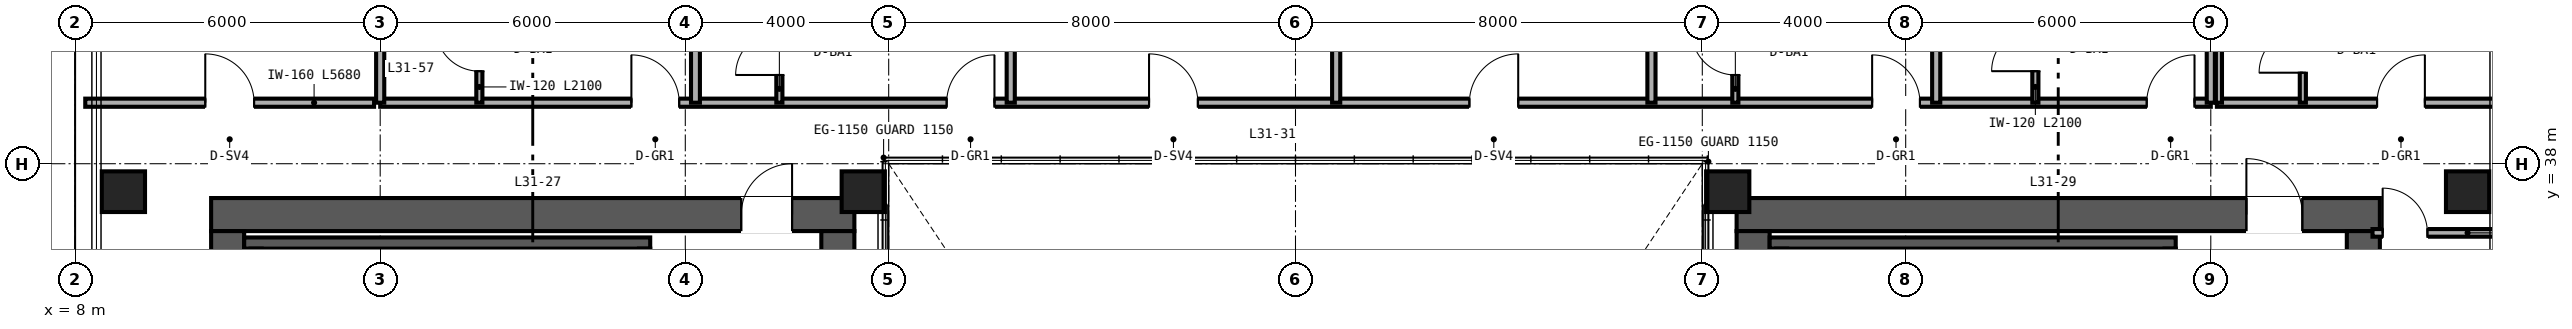
"""IFC4 building model, lengths in metres.
Left out: names, types, materials, properties, quantities, classifications, styles, units other than length and angle.
Written with IfcOpenShell. Run it as: python <this file> out.ifc"""

import sys

from ifc_helpers import new_model, si_unit, direction, frame, frame_2d, origin, origin_2d, place, context, subcontext, project, spatial, rectangle, hollow_rectangle, extrude, source, transform, mapped, element, fill, save


model = new_model("IFC4")
c1 = context("Model", 3, precision=1e-05, world=origin(), true_north=direction((0.0, 1.0)))
c2 = subcontext(c1, "Body", "Model", "MODEL_VIEW")
j1 = project(units=[si_unit("LENGTHUNIT", "METRE"), si_unit("PLANEANGLEUNIT", "RADIAN")], contexts=[c1])
p1 = place(None, origin())
s1 = spatial("IfcSite", under=j1, at=p1, CompositionType="ELEMENT")
p2 = place(p1, origin())
s2 = spatial("IfcBuilding", under=s1, at=p2, CompositionType="ELEMENT")
p3 = place(p2, frame((0.0, 0.0, 126.0)))
s3 = spatial("IfcBuildingStorey", under=s2, at=p3, CompositionType="ELEMENT", Elevation=126.0)
p4 = place(p3, frame((10.675, 37.0, 0.0), z_axis=(0.0, 0.0, 1.0), x_axis=(1.0, 0.0, 0.0)))
e1 = element("IfcWall", 1, at=p4, inside=s3, PredefinedType="SHEAR", context=c2, shape_type="SweptSolid", body=[
    extrude(rectangle(XDim=12.65, YDim=0.65, at=frame_2d((6.325, 0.0))), origin(), (0.0, 0.0, 1.0), 3.36),
])
p5 = place(p4, frame((10.425, 0.0, 0.0)))
e2 = element("IfcOpeningElement", 2, at=p5, cuts=e1, PredefinedType="OPENING", context=c2, shape_type="SweptSolid", body=[
    extrude(rectangle(XDim=1.0, YDim=2.15, at=frame_2d((0.5, 1.075))), frame((0.0, 0.335, 0.0), z_axis=(0.0, -1.0, 0.0), x_axis=(1.0, 0.0, 0.0)), (0.0, 0.0, 1.0), 0.67),
])
for number, where, z_axis, x_axis in (
    (3, (11.0, 15.325, 0.0), (0.0, 0.0, 1.0), (0.0, 1.0, 0.0)),
    (4, (23.0, 15.325, 0.0), (0.0, 0.0, 1.0), (0.0, 1.0, 0.0)),
):
    element("IfcWall", number, at=place(p3, frame(where, z_axis=z_axis, x_axis=x_axis)), inside=s3, PredefinedType="SHEAR", context=c2, shape_type="SweptSolid", body=[
        extrude(rectangle(XDim=21.35, YDim=0.65, at=frame_2d((10.675, 0.0))), origin(), (0.0, 0.0, 1.0), 3.36),
    ])
p6 = place(p3, frame((40.675, 37.0, 0.0), z_axis=(0.0, 0.0, 1.0), x_axis=(1.0, 0.0, 0.0)))
e5 = element("IfcWall", 5, at=p6, inside=s3, PredefinedType="SHEAR", context=c2, shape_type="SweptSolid", body=[
    extrude(rectangle(XDim=12.65, YDim=0.65, at=frame_2d((6.325, 0.0))), origin(), (0.0, 0.0, 1.0), 3.36),
])
p7 = place(p6, frame((10.025, 0.0, 0.0)))
e6 = element("IfcOpeningElement", 6, at=p7, cuts=e5, PredefinedType="OPENING", context=c2, shape_type="SweptSolid", body=[
    extrude(rectangle(XDim=1.1, YDim=2.15, at=frame_2d((0.55, 1.075))), frame((0.0, 0.335, 0.0), z_axis=(0.0, -1.0, 0.0), x_axis=(1.0, 0.0, 0.0)), (0.0, 0.0, 1.0), 0.67),
])
for number, where, z_axis, x_axis in (
    (7, (41.0, 15.325, 0.0), (0.0, 0.0, 1.0), (0.0, 1.0, 0.0)),
    (8, (53.0, 15.325, 0.0), (0.0, 0.0, 1.0), (0.0, 1.0, 0.0)),
):
    element("IfcWall", number, at=place(p3, frame(where, z_axis=z_axis, x_axis=x_axis)), inside=s3, PredefinedType="SHEAR", context=c2, shape_type="SweptSolid", body=[
        extrude(rectangle(XDim=21.35, YDim=0.65, at=frame_2d((10.675, 0.0))), origin(), (0.0, 0.0, 1.0), 3.36),
    ])
p8 = place(p3, frame((11.325, 36.44, 0.0), z_axis=(0.0, 0.0, 1.0), x_axis=(1.0, 0.0, 0.0)))
e9 = element("IfcWall", 9, at=p8, inside=s3, PredefinedType="SHEAR", context=c2, shape_type="SweptSolid", body=[
    extrude(rectangle(XDim=7.985, YDim=0.22, at=frame_2d((3.993, 0.0))), origin(), (0.0, 0.0, 1.0), 3.4),
])
for number, where, z_axis, x_axis in (
    (10, (11.56, 33.05, 0.0), (0.0, 0.0, 1.0), (0.0, 1.0, 0.0)),
    (11, (19.2, 33.05, 0.0), (0.0, 0.0, 1.0), (0.0, 1.0, 0.0)),
):
    element("IfcWall", number, at=place(p3, frame(where, z_axis=z_axis, x_axis=x_axis)), inside=s3, PredefinedType="SHEAR", context=c2, shape_type="SweptSolid", body=[
        extrude(rectangle(XDim=3.28, YDim=0.22, at=frame_2d((1.64, 0.0))), origin(), (0.0, 0.0, 1.0), 3.4),
    ])
p9 = place(p3, frame((41.325, 36.44, 0.0), z_axis=(0.0, 0.0, 1.0), x_axis=(1.0, 0.0, 0.0)))
e12 = element("IfcWall", 12, at=p9, inside=s3, PredefinedType="SHEAR", context=c2, shape_type="SweptSolid", body=[
    extrude(rectangle(XDim=7.985, YDim=0.22, at=frame_2d((3.993, 0.0))), origin(), (0.0, 0.0, 1.0), 3.4),
])
for number, where, z_axis, x_axis in (
    (13, (41.56, 33.05, 0.0), (0.0, 0.0, 1.0), (0.0, 1.0, 0.0)),
    (14, (49.2, 33.05, 0.0), (0.0, 0.0, 1.0), (0.0, 1.0, 0.0)),
):
    element("IfcWall", number, at=place(p3, frame(where, z_axis=z_axis, x_axis=x_axis)), inside=s3, PredefinedType="SHEAR", context=c2, shape_type="SweptSolid", body=[
        extrude(rectangle(XDim=3.28, YDim=0.22, at=frame_2d((1.64, 0.0))), origin(), (0.0, 0.0, 1.0), 3.4),
    ])
m1 = source(origin(), c2, "Body", "SweptSolid", [
    extrude(hollow_rectangle(XDim=0.85, YDim=0.8, WallThickness=0.032, at=origin_2d()), origin(), (0.0, 0.0, 1.0), 3.36),
])
for number, where, z_axis, x_axis in (
    (15, (8.95, 37.45, 0.0), (0.0, 0.0, 1.0), (1.0, 0.0, 0.0)),
    (16, (23.5, 37.45, 0.0), (0.0, 0.0, 1.0), (1.0, 0.0, 0.0)),
    (17, (40.5, 37.45, 0.0), (0.0, 0.0, 1.0), (1.0, 0.0, 0.0)),
    (18, (55.05, 37.45, 0.0), (0.0, 0.0, 1.0), (1.0, 0.0, 0.0)),
):
    element("IfcColumn", number, at=place(p3, frame(where, z_axis=z_axis, x_axis=x_axis)), inside=s3, PredefinedType="COLUMN", context=c2, shape_type="MappedRepresentation", body=[
        mapped(m1, transform((0.0, 0.0, 0.0), scale=1.0)),
    ])
p10 = place(p3, frame((53.18, 36.64, 0.0), z_axis=(0.0, 0.0, 1.0), x_axis=(1.0, 0.0, 0.0)))
e19 = element("IfcWall", 19, at=p10, inside=s3, PredefinedType="PARTITIONING", context=c2, shape_type="SweptSolid", body=[
    extrude(rectangle(XDim=2.66, YDim=0.15, at=frame_2d((1.33, 0.0))), origin(), (0.0, 0.0, 1.0), 2.743),
])
p11 = place(p10, frame((0.2, 0.0, 0.0)))
e20 = element("IfcOpeningElement", 20, at=p11, cuts=e19, PredefinedType="OPENING", context=c2, shape_type="SweptSolid", body=[
    extrude(rectangle(XDim=0.88, YDim=2.15, at=frame_2d((0.44, 1.075))), frame((0.0, 0.085, 0.0), z_axis=(0.0, -1.0, 0.0), x_axis=(1.0, 0.0, 0.0)), (0.0, 0.0, 1.0), 0.17),
])
p12 = place(p3, frame((8.2, 39.2, 0.0), z_axis=(0.0, 0.0, 1.0), x_axis=(1.0, 0.0, 0.0)))
e21 = element("IfcWall", 21, at=p12, inside=s3, PredefinedType="PARTITIONING", context=c2, shape_type="SweptSolid", body=[
    extrude(rectangle(XDim=5.68, YDim=0.16, at=frame_2d((2.84, 0.0))), origin(), (0.0, 0.0, 1.0), 3.36),
])
p13 = place(p12, frame((2.36, 0.0, 0.0)))
e22 = element("IfcOpeningElement", 22, at=p13, cuts=e21, PredefinedType="OPENING", context=c2, shape_type="SweptSolid", body=[
    extrude(rectangle(XDim=0.96, YDim=2.15, at=frame_2d((0.48, 1.075))), frame((0.0, 0.09, 0.0), z_axis=(0.0, -1.0, 0.0), x_axis=(1.0, 0.0, 0.0)), (0.0, 0.0, 1.0), 0.18),
])
p14 = place(p3, frame((50.12, 39.2, 0.0), z_axis=(0.0, 0.0, 1.0), x_axis=(1.0, 0.0, 0.0)))
e23 = element("IfcWall", 23, at=p14, inside=s3, PredefinedType="PARTITIONING", context=c2, shape_type="SweptSolid", body=[
    extrude(rectangle(XDim=5.68, YDim=0.16, at=frame_2d((2.84, 0.0))), origin(), (0.0, 0.0, 1.0), 3.36),
])
p15 = place(p14, frame((3.15, 0.0, 0.0)))
e24 = element("IfcOpeningElement", 24, at=p15, cuts=e23, PredefinedType="OPENING", context=c2, shape_type="SweptSolid", body=[
    extrude(rectangle(XDim=0.94, YDim=2.15, at=frame_2d((0.47, 1.075))), frame((0.0, 0.09, 0.0), z_axis=(0.0, -1.0, 0.0), x_axis=(1.0, 0.0, 0.0)), (0.0, 0.0, 1.0), 0.18),
])
p16 = place(p3, frame((51.81, 39.2, 0.0), z_axis=(0.0, 0.0, 1.0), x_axis=(0.0, 1.0, 0.0)))
e25 = element("IfcWall", 25, at=p16, inside=s3, PredefinedType="PARTITIONING", context=c2, shape_type="SweptSolid", body=[
    extrude(rectangle(XDim=2.04, YDim=0.12, at=frame_2d((1.02, 0.0))), origin(), (0.0, 0.0, 1.0), 3.36),
])
p17 = place(p16, frame((0.59, 0.0, 0.0)))
e26 = element("IfcOpeningElement", 26, at=p17, cuts=e25, PredefinedType="OPENING", context=c2, shape_type="SweptSolid", body=[
    extrude(rectangle(XDim=0.86, YDim=2.1, at=frame_2d((0.43, 1.05))), frame((0.0, 0.07, 0.0), z_axis=(0.0, -1.0, 0.0), x_axis=(1.0, 0.0, 0.0)), (0.0, 0.0, 1.0), 0.14),
])
p18 = place(p3, frame((50.16, 39.2, 0.0), z_axis=(0.0, 0.0, 1.0), x_axis=(0.0, 1.0, 0.0)))
e27 = element("IfcWall", 27, at=p18, inside=s3, PredefinedType="PARTITIONING", context=c2, shape_type="SweptSolid", body=[
    extrude(rectangle(XDim=2.04, YDim=0.12, at=frame_2d((1.02, 0.0))), origin(), (0.0, 0.0, 1.0), 3.36),
])
p19 = place(p3, frame((14.0, 39.2, 0.0), z_axis=(0.0, 0.0, 1.0), x_axis=(1.0, 0.0, 0.0)))
e28 = element("IfcWall", 28, at=p19, inside=s3, PredefinedType="PARTITIONING", context=c2, shape_type="SweptSolid", body=[
    extrude(rectangle(XDim=36.0, YDim=0.16, at=frame_2d((18.0, 0.0))), origin(), (0.0, 0.0, 1.0), 2.581),
])
p20 = place(p19, frame((4.94, 0.0, 0.0)))
e29 = element("IfcOpeningElement", 29, at=p20, cuts=e28, PredefinedType="OPENING", context=c2, shape_type="SweptSolid", body=[
    extrude(rectangle(XDim=0.94, YDim=2.15, at=frame_2d((0.47, 1.075))), frame((0.0, 0.09, 0.0), z_axis=(0.0, -1.0, 0.0), x_axis=(1.0, 0.0, 0.0)), (0.0, 0.0, 1.0), 0.18),
])
p21 = place(p19, frame((11.14, 0.0, 0.0)))
e30 = element("IfcOpeningElement", 30, at=p21, cuts=e28, PredefinedType="OPENING", context=c2, shape_type="SweptSolid", body=[
    extrude(rectangle(XDim=0.94, YDim=2.15, at=frame_2d((0.47, 1.075))), frame((0.0, 0.09, 0.0), z_axis=(0.0, -1.0, 0.0), x_axis=(1.0, 0.0, 0.0)), (0.0, 0.0, 1.0), 0.18),
])
p22 = place(p19, frame((15.12, 0.0, 0.0)))
e31 = element("IfcOpeningElement", 31, at=p22, cuts=e28, PredefinedType="OPENING", context=c2, shape_type="SweptSolid", body=[
    extrude(rectangle(XDim=0.96, YDim=2.15, at=frame_2d((0.48, 1.075))), frame((0.0, 0.09, 0.0), z_axis=(0.0, -1.0, 0.0), x_axis=(1.0, 0.0, 0.0)), (0.0, 0.0, 1.0), 0.18),
])
p23 = place(p19, frame((21.42, 0.0, 0.0)))
e32 = element("IfcOpeningElement", 32, at=p23, cuts=e28, PredefinedType="OPENING", context=c2, shape_type="SweptSolid", body=[
    extrude(rectangle(XDim=0.96, YDim=2.15, at=frame_2d((0.48, 1.075))), frame((0.0, 0.09, 0.0), z_axis=(0.0, -1.0, 0.0), x_axis=(1.0, 0.0, 0.0)), (0.0, 0.0, 1.0), 0.18),
])
p24 = place(p19, frame((29.34, 0.0, 0.0)))
e33 = element("IfcOpeningElement", 33, at=p24, cuts=e28, PredefinedType="OPENING", context=c2, shape_type="SweptSolid", body=[
    extrude(rectangle(XDim=0.94, YDim=2.15, at=frame_2d((0.47, 1.075))), frame((0.0, 0.09, 0.0), z_axis=(0.0, -1.0, 0.0), x_axis=(1.0, 0.0, 0.0)), (0.0, 0.0, 1.0), 0.18),
])
p25 = place(p19, frame((34.74, 0.0, 0.0)))
e34 = element("IfcOpeningElement", 34, at=p25, cuts=e28, PredefinedType="OPENING", context=c2, shape_type="SweptSolid", body=[
    extrude(rectangle(XDim=0.94, YDim=2.15, at=frame_2d((0.47, 1.075))), frame((0.0, 0.09, 0.0), z_axis=(0.0, -1.0, 0.0), x_axis=(1.0, 0.0, 0.0)), (0.0, 0.0, 1.0), 0.18),
])
for number, where, z_axis, x_axis in (
    (35, (14.0, 39.2, 0.0), (0.0, 0.0, 1.0), (0.0, 1.0, 0.0)),
    (36, (50.0, 39.2, 0.0), (0.0, 0.0, 1.0), (0.0, 1.0, 0.0)),
):
    element("IfcWall", number, at=place(p3, frame(where, z_axis=z_axis, x_axis=x_axis)), inside=s3, PredefinedType="PARTITIONING", context=c2, shape_type="SweptSolid", body=[
        extrude(rectangle(XDim=10.44, YDim=0.16, at=frame_2d((5.22, 0.0))), origin(), (0.0, 0.0, 1.0), 2.667),
    ])
p26 = place(p3, frame((20.2, 39.2, 0.0), z_axis=(0.0, 0.0, 1.0), x_axis=(0.0, 1.0, 0.0)))
e37 = element("IfcWall", 37, at=p26, inside=s3, PredefinedType="PARTITIONING", context=c2, shape_type="SweptSolid", body=[
    extrude(rectangle(XDim=10.44, YDim=0.175, at=frame_2d((5.22, 0.0))), origin(), (0.0, 0.0, 1.0), 2.667),
])
p27 = place(p3, frame((15.95, 39.2, 0.0), z_axis=(0.0, 0.0, 1.0), x_axis=(0.0, 1.0, 0.0)))
e38 = element("IfcWall", 38, at=p27, inside=s3, PredefinedType="PARTITIONING", context=c2, shape_type="SweptSolid", body=[
    extrude(rectangle(XDim=2.1, YDim=0.12, at=frame_2d((1.05, 0.0))), origin(), (0.0, 0.0, 1.0), 3.36),
])
p28 = place(p27, frame((0.62, 0.0, 0.0)))
e39 = element("IfcOpeningElement", 39, at=p28, cuts=e38, PredefinedType="OPENING", context=c2, shape_type="SweptSolid", body=[
    extrude(rectangle(XDim=0.86, YDim=2.1, at=frame_2d((0.43, 1.05))), frame((0.0, 0.07, 0.0), z_axis=(0.0, -1.0, 0.0), x_axis=(1.0, 0.0, 0.0)), (0.0, 0.0, 1.0), 0.14),
])
p29 = place(p3, frame((26.4, 39.2, 0.0), z_axis=(0.0, 0.0, 1.0), x_axis=(0.0, 1.0, 0.0)))
e40 = element("IfcWall", 40, at=p29, inside=s3, PredefinedType="PARTITIONING", context=c2, shape_type="SweptSolid", body=[
    extrude(rectangle(XDim=10.44, YDim=0.16, at=frame_2d((5.22, 0.0))), origin(), (0.0, 0.0, 1.0), 2.433),
])
p30 = place(p3, frame((21.85, 39.2, 0.0), z_axis=(0.0, 0.0, 1.0), x_axis=(0.0, 1.0, 0.0)))
e41 = element("IfcWall", 41, at=p30, inside=s3, PredefinedType="PARTITIONING", context=c2, shape_type="SweptSolid", body=[
    extrude(rectangle(XDim=1.95, YDim=0.12, at=frame_2d((0.975, 0.0))), origin(), (0.0, 0.0, 1.0), 3.36),
])
p31 = place(p30, frame((0.545, 0.0, 0.0)))
e42 = element("IfcOpeningElement", 42, at=p31, cuts=e41, PredefinedType="OPENING", context=c2, shape_type="SweptSolid", body=[
    extrude(rectangle(XDim=0.86, YDim=2.1, at=frame_2d((0.43, 1.05))), frame((0.0, 0.07, 0.0), z_axis=(0.0, -1.0, 0.0), x_axis=(1.0, 0.0, 0.0)), (0.0, 0.0, 1.0), 0.14),
])
for number, where, z_axis, x_axis in (
    (43, (32.8, 39.2, 0.0), (0.0, 0.0, 1.0), (0.0, 1.0, 0.0)),
    (44, (39.0, 39.2, 0.0), (0.0, 0.0, 1.0), (0.0, 1.0, 0.0)),
):
    element("IfcWall", number, at=place(p3, frame(where, z_axis=z_axis, x_axis=x_axis)), inside=s3, PredefinedType="PARTITIONING", context=c2, shape_type="SweptSolid", body=[
        extrude(rectangle(XDim=10.44, YDim=0.16, at=frame_2d((5.22, 0.0))), origin(), (0.0, 0.0, 1.0), 2.433),
    ])
p32 = place(p3, frame((44.6, 39.2, 0.0), z_axis=(0.0, 0.0, 1.0), x_axis=(0.0, 1.0, 0.0)))
e45 = element("IfcWall", 45, at=p32, inside=s3, PredefinedType="PARTITIONING", context=c2, shape_type="SweptSolid", body=[
    extrude(rectangle(XDim=10.44, YDim=0.16, at=frame_2d((5.22, 0.0))), origin(), (0.0, 0.0, 1.0), 2.667),
])
p33 = place(p3, frame((40.65, 39.2, 0.0), z_axis=(0.0, 0.0, 1.0), x_axis=(0.0, 1.0, 0.0)))
e46 = element("IfcWall", 46, at=p33, inside=s3, PredefinedType="PARTITIONING", context=c2, shape_type="SweptSolid", body=[
    extrude(rectangle(XDim=1.95, YDim=0.12, at=frame_2d((0.975, 0.0))), origin(), (0.0, 0.0, 1.0), 2.581),
])
p34 = place(p33, frame((0.545, 0.0, 0.0)))
e47 = element("IfcOpeningElement", 47, at=p34, cuts=e46, PredefinedType="OPENING", context=c2, shape_type="SweptSolid", body=[
    extrude(rectangle(XDim=0.86, YDim=2.1, at=frame_2d((0.43, 1.05))), frame((0.0, 0.07, 0.0), z_axis=(0.0, -1.0, 0.0), x_axis=(1.0, 0.0, 0.0)), (0.0, 0.0, 1.0), 0.14),
])
p35 = place(p3, frame((46.55, 39.2, 0.0), z_axis=(0.0, 0.0, 1.0), x_axis=(0.0, 1.0, 0.0)))
e48 = element("IfcWall", 48, at=p35, inside=s3, PredefinedType="PARTITIONING", context=c2, shape_type="SweptSolid", body=[
    extrude(rectangle(XDim=2.1, YDim=0.12, at=frame_2d((1.05, 0.0))), origin(), (0.0, 0.0, 1.0), 3.36),
])
p36 = place(p35, frame((0.62, 0.0, 0.0)))
e49 = element("IfcOpeningElement", 49, at=p36, cuts=e48, PredefinedType="OPENING", context=c2, shape_type="SweptSolid", body=[
    extrude(rectangle(XDim=0.86, YDim=2.1, at=frame_2d((0.43, 1.05))), frame((0.0, 0.07, 0.0), z_axis=(0.0, -1.0, 0.0), x_axis=(1.0, 0.0, 0.0)), (0.0, 0.0, 1.0), 0.14),
])
m2 = source(origin(), c2, "Body", "SweptSolid", [
    extrude(rectangle(XDim=1.0, YDim=2.15, at=frame_2d((0.5, 1.075))), frame((0.0, 0.025, 0.0), z_axis=(0.0, -1.0, 0.0), x_axis=(1.0, 0.0, 0.0)), (0.0, 0.0, 1.0), 0.05),
])
p37 = place(p5, origin())
e50 = element("IfcDoor", 50, at=p37, inside=s3, OperationType="SINGLE_SWING_RIGHT", PredefinedType="DOOR", context=c2, shape_type="MappedRepresentation", body=[
    mapped(m2, transform((0.0, 0.0, 0.0), scale=1.0)),
])
fill(e2, e50)
m3 = source(origin(), c2, "Body", "SweptSolid", [
    extrude(rectangle(XDim=1.1, YDim=2.15, at=frame_2d((0.55, 1.075))), frame((0.0, 0.025, 0.0), z_axis=(0.0, -1.0, 0.0), x_axis=(1.0, 0.0, 0.0)), (0.0, 0.0, 1.0), 0.05),
])
p38 = place(p7, origin())
e51 = element("IfcDoor", 51, at=p38, inside=s3, OperationType="SINGLE_SWING_LEFT", PredefinedType="DOOR", context=c2, shape_type="MappedRepresentation", body=[
    mapped(m3, transform((0.0, 0.0, 0.0), scale=1.0)),
])
fill(e6, e51)
m4 = source(origin(), c2, "Body", "SweptSolid", [
    extrude(rectangle(XDim=0.88, YDim=2.15, at=frame_2d((0.44, 1.075))), frame((0.0, 0.025, 0.0), z_axis=(0.0, -1.0, 0.0), x_axis=(1.0, 0.0, 0.0)), (0.0, 0.0, 1.0), 0.05),
])
p39 = place(p11, origin())
e52 = element("IfcDoor", 52, at=p39, inside=s3, OperationType="SINGLE_SWING_LEFT", PredefinedType="DOOR", context=c2, shape_type="MappedRepresentation", body=[
    mapped(m4, transform((0.0, 0.0, 0.0), scale=1.0)),
])
fill(e20, e52)
m5 = source(origin(), c2, "Body", "SweptSolid", [
    extrude(rectangle(XDim=0.96, YDim=2.15, at=frame_2d((0.48, 1.075))), frame((0.0, 0.025, 0.0), z_axis=(0.0, -1.0, 0.0), x_axis=(1.0, 0.0, 0.0)), (0.0, 0.0, 1.0), 0.05),
])
p40 = place(p13, origin())
e53 = element("IfcDoor", 53, at=p40, inside=s3, OperationType="SINGLE_SWING_LEFT", PredefinedType="DOOR", context=c2, shape_type="MappedRepresentation", body=[
    mapped(m5, transform((0.0, 0.0, 0.0), scale=1.0)),
])
fill(e22, e53)
m6 = source(origin(), c2, "Body", "SweptSolid", [
    extrude(rectangle(XDim=0.86, YDim=2.1, at=frame_2d((0.43, 1.05))), frame((0.0, 0.025, 0.0), z_axis=(0.0, -1.0, 0.0), x_axis=(1.0, 0.0, 0.0)), (0.0, 0.0, 1.0), 0.05),
])
p41 = place(p17, origin())
e54 = element("IfcDoor", 54, at=p41, inside=s3, OperationType="SINGLE_SWING_LEFT", PredefinedType="DOOR", context=c2, shape_type="MappedRepresentation", body=[
    mapped(m6, transform((0.0, 0.0, 0.0), scale=1.0)),
])
fill(e26, e54)
m7 = source(origin(), c2, "Body", "SweptSolid", [
    extrude(rectangle(XDim=0.94, YDim=2.15, at=frame_2d((0.47, 1.075))), frame((0.0, 0.025, 0.0), z_axis=(0.0, -1.0, 0.0), x_axis=(1.0, 0.0, 0.0)), (0.0, 0.0, 1.0), 0.05),
])
p42 = place(p15, origin())
e55 = element("IfcDoor", 55, at=p42, inside=s3, OperationType="SINGLE_SWING_RIGHT", PredefinedType="DOOR", context=c2, shape_type="MappedRepresentation", body=[
    mapped(m7, transform((0.0, 0.0, 0.0), scale=1.0)),
])
fill(e24, e55)
p43 = place(p28, origin())
e56 = element("IfcDoor", 56, at=p43, inside=s3, OperationType="SINGLE_SWING_RIGHT", PredefinedType="DOOR", context=c2, shape_type="MappedRepresentation", body=[
    mapped(m6, transform((0.0, 0.0, 0.0), scale=1.0)),
])
fill(e39, e56)
p44 = place(p31, origin())
e57 = element("IfcDoor", 57, at=p44, inside=s3, OperationType="SINGLE_SWING_LEFT", PredefinedType="DOOR", context=c2, shape_type="MappedRepresentation", body=[
    mapped(m6, transform((0.0, 0.0, 0.0), scale=1.0)),
])
fill(e42, e57)
p45 = place(p34, origin())
e58 = element("IfcDoor", 58, at=p45, inside=s3, OperationType="SINGLE_SWING_RIGHT", PredefinedType="DOOR", context=c2, shape_type="MappedRepresentation", body=[
    mapped(m6, transform((0.0, 0.0, 0.0), scale=1.0)),
])
fill(e47, e58)
p46 = place(p36, origin())
e59 = element("IfcDoor", 59, at=p46, inside=s3, OperationType="SINGLE_SWING_LEFT", PredefinedType="DOOR", context=c2, shape_type="MappedRepresentation", body=[
    mapped(m6, transform((0.0, 0.0, 0.0), scale=1.0)),
])
fill(e49, e59)
p47 = place(p20, origin())
e60 = element("IfcDoor", 60, at=p47, inside=s3, OperationType="SINGLE_SWING_LEFT", PredefinedType="DOOR", context=c2, shape_type="MappedRepresentation", body=[
    mapped(m7, transform((0.0, 0.0, 0.0), scale=1.0)),
])
fill(e29, e60)
p48 = place(p21, origin())
e61 = element("IfcDoor", 61, at=p48, inside=s3, OperationType="SINGLE_SWING_RIGHT", PredefinedType="DOOR", context=c2, shape_type="MappedRepresentation", body=[
    mapped(m7, transform((0.0, 0.0, 0.0), scale=1.0)),
])
fill(e30, e61)
p49 = place(p22, origin())
e62 = element("IfcDoor", 62, at=p49, inside=s3, OperationType="SINGLE_SWING_LEFT", PredefinedType="DOOR", context=c2, shape_type="MappedRepresentation", body=[
    mapped(m5, transform((0.0, 0.0, 0.0), scale=1.0)),
])
fill(e31, e62)
p50 = place(p23, origin())
e63 = element("IfcDoor", 63, at=p50, inside=s3, OperationType="SINGLE_SWING_RIGHT", PredefinedType="DOOR", context=c2, shape_type="MappedRepresentation", body=[
    mapped(m5, transform((0.0, 0.0, 0.0), scale=1.0)),
])
fill(e32, e63)
p51 = place(p24, origin())
e64 = element("IfcDoor", 64, at=p51, inside=s3, OperationType="SINGLE_SWING_LEFT", PredefinedType="DOOR", context=c2, shape_type="MappedRepresentation", body=[
    mapped(m7, transform((0.0, 0.0, 0.0), scale=1.0)),
])
fill(e33, e64)
p52 = place(p25, origin())
e65 = element("IfcDoor", 65, at=p52, inside=s3, OperationType="SINGLE_SWING_RIGHT", PredefinedType="DOOR", context=c2, shape_type="MappedRepresentation", body=[
    mapped(m7, transform((0.0, 0.0, 0.0), scale=1.0)),
])
fill(e34, e65)
save(model, sys.argv[1])
